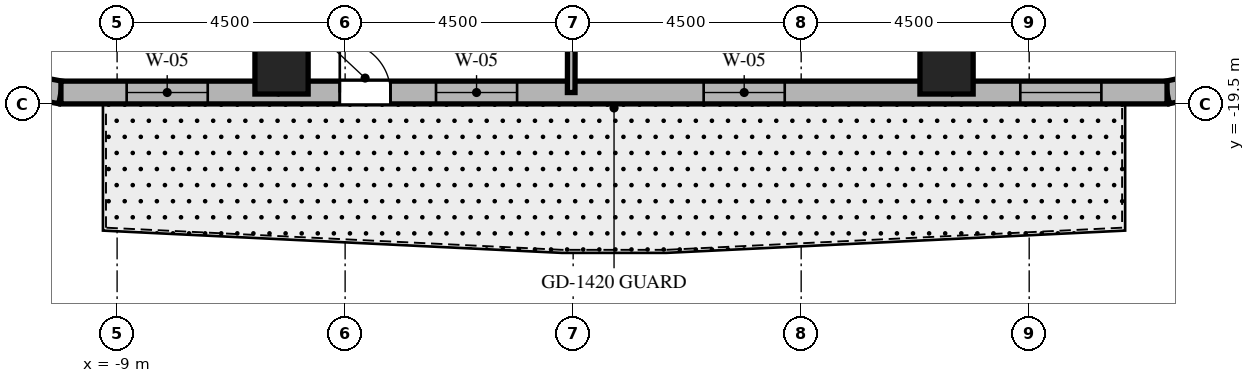
"""IFC4 building model, lengths in metres.
Left out: names, types, materials, properties, quantities, classifications, styles, units other than length and angle.
Written with IfcOpenShell. Run it as: python <this file> out.ifc"""

import sys

from ifc_helpers import new_model, si_unit, direction, frame, frame_2d, origin, origin_2d, place, context, subcontext, project, spatial, rectangle, extrude, element, fill, save


model = new_model("IFC4")
c1 = context("Model", 3, precision=1e-05, world=origin(), true_north=direction((0.0, 1.0)))
c2 = subcontext(c1, "Body", "Model", "MODEL_VIEW")
j1 = project(units=[si_unit("LENGTHUNIT", "METRE"), si_unit("PLANEANGLEUNIT", "RADIAN")], contexts=[c1])
p1 = place(None, origin())
s1 = spatial("IfcSite", under=j1, at=p1, CompositionType="ELEMENT")
p2 = place(p1, origin())
s2 = spatial("IfcBuilding", under=s1, at=p2, CompositionType="ELEMENT")
p3 = place(p2, frame((0.0, 0.0, 162.8)))
s3 = spatial("IfcBuildingStorey", under=s2, at=p3, CompositionType="ELEMENT", Elevation=162.8)
for number, where, z_axis, x_axis in (
    (1, (-5.755, -18.78, 0.0), (0.0, 0.0, 1.0), (1.0, 0.0, 0.0)),
    (2, (7.369, -18.78, 0.0), (0.0, 0.0, 1.0), (1.0, 0.0, 0.0)),
):
    element("IfcColumn", number, at=place(p3, frame(where, z_axis=z_axis, x_axis=x_axis)), inside=s3, PredefinedType="COLUMN", context=c2, shape_type="SweptSolid", body=[
        extrude(rectangle(XDim=1.05, YDim=1.05, at=origin_2d()), origin(), (0.0, 0.0, 1.0), 3.7),
    ])
p4 = place(p3, frame((-11.349, -19.043, 0.0), z_axis=(0.0, 0.0, 1.0), x_axis=(0.982931267051, -0.183973161772, 0.0)))
e3 = element("IfcWall", 3, at=p4, inside=s3, PredefinedType="SOLIDWALL", context=c2, shape_type="SweptSolid", body=[
    extrude(rectangle(XDim=1.262, YDim=0.45, at=frame_2d((0.631, 0.0))), origin(), (0.0, 0.0, 1.0), 3.4),
])
p5 = place(p3, frame((11.72, -19.275, 0.0), z_axis=(0.0, 0.0, 1.0), x_axis=(0.97893106758, 0.204191001093, 0.0)))
e4 = element("IfcWall", 4, at=p5, inside=s3, PredefinedType="SOLIDWALL", context=c2, shape_type="SweptSolid", body=[
    extrude(rectangle(XDim=1.4, YDim=0.45, at=frame_2d((0.7, 0.0))), origin(), (0.0, 0.0, 1.0), 3.4),
])
p6 = place(p3, frame((-10.108, -19.275, 0.0), z_axis=(0.0, 0.0, 1.0), x_axis=(1.0, 0.0, 0.0)))
e5 = element("IfcWall", 5, at=p6, inside=s3, PredefinedType="SOLIDWALL", context=c2, shape_type="SweptSolid", body=[
    extrude(rectangle(XDim=21.829, YDim=0.45, at=frame_2d((10.915, 0.0))), origin(), (0.0, 0.0, 1.0), 3.4),
])
p7 = place(p6, frame((5.503, 0.0, 0.0)))
e6 = element("IfcOpeningElement", 6, at=p7, cuts=e5, PredefinedType="OPENING", context=c2, shape_type="SweptSolid", body=[
    extrude(rectangle(XDim=1.0, YDim=2.15, at=frame_2d((0.5, 1.075))), frame((0.0, 0.235, 0.0), z_axis=(0.0, -1.0, 0.0), x_axis=(1.0, 0.0, 0.0)), (0.0, 0.0, 1.0), 0.47),
])
p8 = place(p6, frame((1.297, 0.0, 0.8)))
e7 = element("IfcOpeningElement", 7, at=p8, cuts=e5, PredefinedType="OPENING", context=c2, shape_type="SweptSolid", body=[
    extrude(rectangle(XDim=1.6, YDim=1.75, at=frame_2d((0.8, 0.875))), frame((0.0, 0.235, 0.0), z_axis=(0.0, -1.0, 0.0), x_axis=(1.0, 0.0, 0.0)), (0.0, 0.0, 1.0), 0.47),
])
p9 = place(p6, frame((7.402, 0.0, 0.8)))
e8 = element("IfcOpeningElement", 8, at=p9, cuts=e5, PredefinedType="OPENING", context=c2, shape_type="SweptSolid", body=[
    extrude(rectangle(XDim=1.6, YDim=1.75, at=frame_2d((0.8, 0.875))), frame((0.0, 0.235, 0.0), z_axis=(0.0, -1.0, 0.0), x_axis=(1.0, 0.0, 0.0)), (0.0, 0.0, 1.0), 0.47),
])
p10 = place(p6, frame((12.684, 0.0, 0.8)))
e9 = element("IfcOpeningElement", 9, at=p10, cuts=e5, PredefinedType="OPENING", context=c2, shape_type="SweptSolid", body=[
    extrude(rectangle(XDim=1.6, YDim=1.75, at=frame_2d((0.8, 0.875))), frame((0.0, 0.235, 0.0), z_axis=(0.0, -1.0, 0.0), x_axis=(1.0, 0.0, 0.0)), (0.0, 0.0, 1.0), 0.47),
])
p11 = place(p6, frame((18.933, 0.0, 0.8)))
e10 = element("IfcOpeningElement", 10, at=p11, cuts=e5, PredefinedType="OPENING", context=c2, shape_type="SweptSolid", body=[
    extrude(rectangle(XDim=1.6, YDim=1.75, at=frame_2d((0.8, 0.875))), frame((0.0, 0.235, 0.0), z_axis=(0.0, -1.0, 0.0), x_axis=(1.0, 0.0, 0.0)), (0.0, 0.0, 1.0), 0.47),
])
p12 = place(p3, frame((-3.631, -11.85, 0.0), z_axis=(0.0, 0.0, 1.0), x_axis=(-0.293007573338, -0.956110120209, 0.0)))
e11 = element("IfcWall", 11, at=p12, inside=s3, PredefinedType="PARTITIONING", context=c2, shape_type="SweptSolid", body=[
    extrude(rectangle(XDim=7.766, YDim=0.15, at=frame_2d((3.883, 0.0))), origin(), (0.0, 0.0, 1.0), 2.64),
])
p13 = place(p3, frame((-0.024, -11.85, 0.0), z_axis=(0.0, 0.0, 1.0), x_axis=(-0.001972901592, -0.999998053828, 0.0)))
e12 = element("IfcWall", 12, at=p13, inside=s3, PredefinedType="PARTITIONING", context=c2, shape_type="SweptSolid", body=[
    extrude(rectangle(XDim=7.425, YDim=0.15, at=frame_2d((3.712, 0.0))), origin(), (0.0, 0.0, 1.0), 2.64),
])
p14 = place(p3, frame((4.65, -11.85, 0.0), z_axis=(0.0, 0.0, 1.0), x_axis=(0.365265947993, -0.930903210456, 0.0)))
e13 = element("IfcWall", 13, at=p14, inside=s3, PredefinedType="PARTITIONING", context=c2, shape_type="SweptSolid", body=[
    extrude(rectangle(XDim=7.976, YDim=0.15, at=frame_2d((3.988, 0.0))), origin(), (0.0, 0.0, 1.0), 2.64),
])
p15 = place(p3, frame((8.39, -11.85, 0.0), z_axis=(0.0, 0.0, 1.0), x_axis=(0.577877530264, -0.816123495566, 0.0)))
e14 = element("IfcWall", 14, at=p15, inside=s3, PredefinedType="PARTITIONING", context=c2, shape_type="SweptSolid", body=[
    extrude(rectangle(XDim=8.382, YDim=0.15, at=frame_2d((4.191, 0.0))), origin(), (0.0, 0.0, 1.0), 2.64),
])
p16 = place(p7, origin())
e15 = element("IfcDoor", 15, at=p16, inside=s3, OperationType="SINGLE_SWING_LEFT", PredefinedType="DOOR", context=c2, shape_type="SweptSolid", body=[
    extrude(rectangle(XDim=1.0, YDim=2.15, at=frame_2d((0.5, 1.075))), frame((0.0, 0.025, 0.0), z_axis=(0.0, -1.0, 0.0), x_axis=(1.0, 0.0, 0.0)), (0.0, 0.0, 1.0), 0.05),
])
fill(e6, e15)
p17 = place(p8, origin())
e16 = element("IfcWindow", 16, at=p17, inside=s3, PartitioningType="SINGLE_PANEL", PredefinedType="WINDOW", context=c2, shape_type="SweptSolid", body=[
    extrude(rectangle(XDim=1.6, YDim=1.75, at=frame_2d((0.8, 0.875))), frame((0.0, 0.03, 0.0), z_axis=(0.0, -1.0, 0.0), x_axis=(1.0, 0.0, 0.0)), (0.0, 0.0, 1.0), 0.06),
])
fill(e7, e16)
p18 = place(p9, origin())
e17 = element("IfcWindow", 17, at=p18, inside=s3, PartitioningType="SINGLE_PANEL", PredefinedType="WINDOW", context=c2, shape_type="SweptSolid", body=[
    extrude(rectangle(XDim=1.6, YDim=1.75, at=frame_2d((0.8, 0.875))), frame((0.0, 0.03, 0.0), z_axis=(0.0, -1.0, 0.0), x_axis=(1.0, 0.0, 0.0)), (0.0, 0.0, 1.0), 0.06),
])
fill(e8, e17)
p19 = place(p10, origin())
e18 = element("IfcWindow", 18, at=p19, inside=s3, PartitioningType="SINGLE_PANEL", PredefinedType="WINDOW", context=c2, shape_type="SweptSolid", body=[
    extrude(rectangle(XDim=1.6, YDim=1.75, at=frame_2d((0.8, 0.875))), frame((0.0, 0.03, 0.0), z_axis=(0.0, -1.0, 0.0), x_axis=(1.0, 0.0, 0.0)), (0.0, 0.0, 1.0), 0.06),
])
fill(e9, e18)
p20 = place(p11, origin())
e19 = element("IfcWindow", 19, at=p20, inside=s3, PartitioningType="SINGLE_PANEL", PredefinedType="WINDOW", context=c2, shape_type="SweptSolid", body=[
    extrude(rectangle(XDim=1.6, YDim=1.75, at=frame_2d((0.8, 0.875))), frame((0.0, 0.03, 0.0), z_axis=(0.0, -1.0, 0.0), x_axis=(1.0, 0.0, 0.0)), (0.0, 0.0, 1.0), 0.06),
])
fill(e10, e19)
save(model, sys.argv[1])
